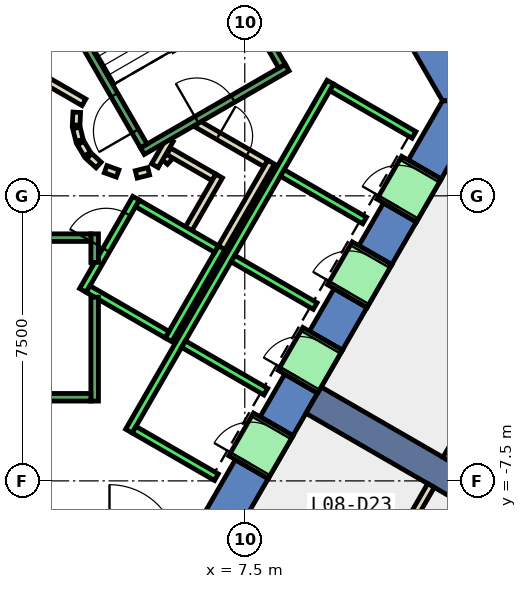
"""IFC4 building model, lengths in metres.
Left out: names, types, materials, properties, quantities, classifications, styles, units other than length and angle.
Written with IfcOpenShell. Run it as: python <this file> out.ifc"""

import sys

from ifc_helpers import new_model, si_unit, direction, frame, frame_2d, origin, place, context, subcontext, project, spatial, polyline, rectangle, outline, extrude, element, fill, save


model = new_model("IFC4")
c1 = context("Model", 3, precision=1e-05, world=origin(), true_north=direction((0.0, 1.0)))
c2 = subcontext(c1, "Body", "Model", "MODEL_VIEW")
j1 = project(units=[si_unit("LENGTHUNIT", "METRE"), si_unit("PLANEANGLEUNIT", "RADIAN")], contexts=[c1])
p1 = place(None, origin())
s1 = spatial("IfcSite", under=j1, at=p1, CompositionType="ELEMENT")
p2 = place(p1, origin())
s2 = spatial("IfcBuilding", under=s1, at=p2, CompositionType="ELEMENT")
p3 = place(p2, frame((0.0, 0.0, 43.4)))
s3 = spatial("IfcBuildingStorey", under=s2, at=p3, CompositionType="ELEMENT", Elevation=43.4)
p4 = place(p3, frame((0.0, 0.0, -0.4)))
e1 = element("IfcWall", 1, at=p4, inside=s3, PredefinedType="SHEAR", context=c2, shape_type="SweptSolid", body=[
    extrude(outline(polyline([(8.517, 11.748), (7.651, 11.248), (12.702, 2.5), (13.856, 2.5), (8.517, 11.748)])), origin(), (0.0, 0.0, 1.0), 4.2),
])
p5 = place(p3, frame((0.0, 0.0, -0.4)))
e2 = element("IfcWall", 2, at=p5, inside=s3, PredefinedType="SHEAR", context=c2, shape_type="SweptSolid", body=[
    extrude(outline(polyline([(8.117, -7.44), (7.252, -6.94), (6.351, -8.5), (6.928, -9.5), (8.117, -7.44)])), origin(), (0.0, 0.0, 1.0), 4.2),
])
p6 = place(p3, frame((0.0, 0.0, -0.4)))
e3 = element("IfcWall", 3, at=p6, inside=s3, PredefinedType="SHEAR", context=c2, shape_type="SweptSolid", body=[
    extrude(outline(polyline([(9.417, -5.189), (8.551, -4.689), (7.902, -5.814), (8.767, -6.314), (9.417, -5.189)])), origin(), (0.0, 0.0, 1.0), 4.2),
])
p7 = place(p3, frame((0.0, 0.0, -0.4)))
e4 = element("IfcWall", 4, at=p7, inside=s3, PredefinedType="SHEAR", context=c2, shape_type="SweptSolid", body=[
    extrude(outline(polyline([(10.717, -2.937), (9.851, -2.437), (9.201, -3.563), (10.067, -4.063), (10.717, -2.937)])), origin(), (0.0, 0.0, 1.0), 4.2),
])
p8 = place(p3, frame((0.0, 0.0, -0.4)))
e5 = element("IfcWall", 5, at=p8, inside=s3, PredefinedType="SHEAR", context=c2, shape_type="SweptSolid", body=[
    extrude(outline(polyline([(12.017, -0.686), (11.151, -0.186), (10.501, -1.311), (11.367, -1.811), (12.017, -0.686)])), origin(), (0.0, 0.0, 1.0), 4.2),
])
p9 = place(p3, frame((0.0, 0.0, -0.4)))
e6 = element("IfcWall", 6, at=p9, inside=s3, PredefinedType="SHEAR", context=c2, shape_type="SweptSolid", body=[
    extrude(outline(polyline([(11.801, 0.94), (12.667, 0.44), (13.856, 2.5), (12.702, 2.5), (11.801, 0.94)])), origin(), (0.0, 0.0, 1.0), 4.2),
])
p10 = place(p3, frame((0.0, 0.0, 3.6)))
e7 = element("IfcWall", 7, at=p10, inside=s3, PredefinedType="SHEAR", context=c2, shape_type="SweptSolid", body=[
    extrude(outline(polyline([(8.767, -6.314), (7.902, -5.814), (7.252, -6.94), (8.117, -7.44), (8.767, -6.314)])), origin(), (0.0, 0.0, 1.0), 0.2),
])
p11 = place(p3, frame((0.0, 0.0, 3.6)))
e8 = element("IfcWall", 8, at=p11, inside=s3, PredefinedType="SHEAR", context=c2, shape_type="SweptSolid", body=[
    extrude(outline(polyline([(10.067, -4.063), (9.201, -3.563), (8.551, -4.689), (9.417, -5.189), (10.067, -4.063)])), origin(), (0.0, 0.0, 1.0), 0.2),
])
p12 = place(p3, frame((0.0, 0.0, 3.6)))
e9 = element("IfcWall", 9, at=p12, inside=s3, PredefinedType="SHEAR", context=c2, shape_type="SweptSolid", body=[
    extrude(outline(polyline([(11.367, -1.811), (10.501, -1.311), (9.851, -2.437), (10.717, -2.937), (11.367, -1.811)])), origin(), (0.0, 0.0, 1.0), 0.2),
])
p13 = place(p3, frame((0.0, 0.0, 3.6)))
e10 = element("IfcWall", 10, at=p13, inside=s3, PredefinedType="SHEAR", context=c2, shape_type="SweptSolid", body=[
    extrude(outline(polyline([(12.667, 0.44), (11.801, 0.94), (11.151, -0.186), (12.017, -0.686), (12.667, 0.44)])), origin(), (0.0, 0.0, 1.0), 0.2),
])
p14 = place(p3, frame((9.31, -5.375, -0.4), z_axis=(0.0, 0.0, 1.0), x_axis=(0.866017533419, -0.500013631625, 0.0)))
e11 = element("IfcWall", 11, at=p14, inside=s3, PredefinedType="SHEAR", context=c2, shape_type="SweptSolid", body=[
    extrude(rectangle(XDim=9.0, YDim=0.8, at=frame_2d((4.5, 0.0))), origin(), (0.0, 0.0, 1.0), 4.2),
])
p15 = place(p3, frame((5.39, 0.898, 0.0), z_axis=(0.0, 0.0, 1.0), x_axis=(0.673828488714, 0.738887791073, 0.0)))
e12 = element("IfcWall", 12, at=p15, inside=s3, PredefinedType="PARTITIONING", context=c2, shape_type="SweptSolid", body=[
    extrude(rectangle(XDim=0.263, YDim=0.2, at=frame_2d((0.131, 0.0))), origin(), (0.0, 0.0, 1.0), 3.8),
])
p16 = place(p3, frame((5.499, 1.172, 0.0), z_axis=(0.0, 0.0, 1.0), x_axis=(0.866333505267, -0.499465972466, 0.0)))
e13 = element("IfcWall", 13, at=p16, inside=s3, PredefinedType="PARTITIONING", context=c2, shape_type="SweptSolid", body=[
    extrude(rectangle(XDim=1.374, YDim=0.2, at=frame_2d((0.687, 0.0))), origin(), (0.0, 0.0, 1.0), 3.8),
])
p17 = place(p3, frame((6.826, 0.522, 0.0), z_axis=(0.0, 0.0, 1.0), x_axis=(-0.500016722714, -0.866015748706, 0.0)))
e14 = element("IfcWall", 14, at=p17, inside=s3, PredefinedType="PARTITIONING", context=c2, shape_type="SweptSolid", body=[
    extrude(rectangle(XDim=1.7, YDim=0.2, at=frame_2d((0.85, 0.0))), origin(), (0.0, 0.0, 1.0), 3.8),
])
p18 = place(p3, frame((6.25, 1.894, 0.0), z_axis=(0.0, 0.0, 1.0), x_axis=(0.866043184279, -0.499969202016, 0.0)))
e15 = element("IfcWall", 15, at=p18, inside=s3, PredefinedType="PARTITIONING", context=c2, shape_type="SweptSolid", body=[
    extrude(rectangle(XDim=2.084, YDim=0.2, at=frame_2d((1.042, 0.0))), origin(), (0.0, 0.0, 1.0), 3.8),
])
p19 = place(p18, frame((0.642, 0.0, 0.0)))
e16 = element("IfcOpeningElement", 16, at=p19, cuts=e15, PredefinedType="OPENING", context=c2, shape_type="SweptSolid", body=[
    extrude(rectangle(XDim=0.9, YDim=2.1, at=frame_2d((0.45, 1.05))), frame((0.0, 0.11, 0.0), z_axis=(0.0, -1.0, 0.0), x_axis=(1.0, 0.0, 0.0)), (0.0, 0.0, 1.0), 0.22),
])
p20 = place(p3, frame((8.192, 0.888, 0.0), z_axis=(0.0, 0.0, 1.0), x_axis=(-0.499940625693, -0.866059680843, 0.0)))
e17 = element("IfcWall", 17, at=p20, inside=s3, PredefinedType="PARTITIONING", context=c2, shape_type="SweptSolid", body=[
    extrude(rectangle(XDim=2.68, YDim=0.2, at=frame_2d((1.34, 0.0))), origin(), (0.0, 0.0, 1.0), 3.8),
])
p21 = place(p3, frame((5.135, 0.793, 0.0), z_axis=(0.0, 0.0, 1.0), x_axis=(0.499526442893, 0.866298639529, 0.0)))
e18 = element("IfcWall", 18, at=p21, inside=s3, PredefinedType="PARTITIONING", context=c2, shape_type="SweptSolid", body=[
    extrude(rectangle(XDim=0.791, YDim=0.2, at=frame_2d((0.396, 0.0))), origin(), (0.0, 0.0, 1.0), 3.8),
])
p22 = place(p3, frame((2.012, 3.186, 0.0), z_axis=(0.0, 0.0, 1.0), x_axis=(0.865891012941, -0.500232699559, 0.0)))
e19 = element("IfcWall", 19, at=p22, inside=s3, PredefinedType="PARTITIONING", context=c2, shape_type="SweptSolid", body=[
    extrude(rectangle(XDim=1.449, YDim=0.2, at=frame_2d((0.725, 0.0))), origin(), (0.0, 0.0, 1.0), 3.8),
])
p23 = place(p3, frame((3.079, 2.199, 0.0), z_axis=(0.0, 0.0, 1.0), x_axis=(-0.047771483479, -0.998858290933, 0.0)))
e20 = element("IfcWall", 20, at=p23, inside=s3, PredefinedType="PARTITIONING", context=c2, shape_type="SweptSolid", body=[
    extrude(rectangle(XDim=0.337, YDim=0.2, at=frame_2d((0.169, 0.0))), origin(), (0.0, 0.0, 1.0), 3.8),
])
p24 = place(p3, frame((3.07, 1.786, 0.0), z_axis=(0.0, 0.0, 1.0), x_axis=(0.242705583207, -0.970099994784, 0.0)))
e21 = element("IfcWall", 21, at=p24, inside=s3, PredefinedType="PARTITIONING", context=c2, shape_type="SweptSolid", body=[
    extrude(rectangle(XDim=0.338, YDim=0.2, at=frame_2d((0.169, 0.0))), origin(), (0.0, 0.0, 1.0), 3.8),
])
for number, where, z_axis, x_axis in (
    (22, (3.182, 1.388, 0.0), (0.0, 0.0, 1.0), (0.512, -0.859, 0.0)),
    (23, (3.404, 1.039, 0.0), (0.0, 0.0, 1.0), (0.74, -0.672, 0.0)),
):
    element("IfcWall", number, at=place(p3, frame(where, z_axis=z_axis, x_axis=x_axis)), inside=s3, PredefinedType="PARTITIONING", context=c2, shape_type="SweptSolid", body=[
        extrude(rectangle(XDim=0.338, YDim=0.2, at=frame_2d((0.169, 0.0))), origin(), (0.0, 0.0, 1.0), 3.8),
    ])
p25 = place(p3, frame((3.838, 0.702, 0.0), z_axis=(0.0, 0.0, 1.0), x_axis=(0.941035081519, -0.338308993895, 0.0)))
e24 = element("IfcWall", 24, at=p25, inside=s3, PredefinedType="PARTITIONING", context=c2, shape_type="SweptSolid", body=[
    extrude(rectangle(XDim=0.337, YDim=0.2, at=frame_2d((0.168, 0.0))), origin(), (0.0, 0.0, 1.0), 3.8),
])
p26 = place(p3, frame((4.644, 0.564, 0.0), z_axis=(0.0, 0.0, 1.0), x_axis=(0.969929076366, 0.243387729394, 0.0)))
e25 = element("IfcWall", 25, at=p26, inside=s3, PredefinedType="PARTITIONING", context=c2, shape_type="SweptSolid", body=[
    extrude(rectangle(XDim=0.337, YDim=0.2, at=frame_2d((0.168, 0.0))), origin(), (0.0, 0.0, 1.0), 3.8),
])
p27 = place(p3, frame((15.122, -2.908, 0.0), z_axis=(0.0, 0.0, 1.0), x_axis=(-0.499922740561, -0.866070004948, 0.0)))
e26 = element("IfcWall", 26, at=p27, inside=s3, PredefinedType="PARTITIONING", context=c2, shape_type="SweptSolid", body=[
    extrude(rectangle(XDim=4.643, YDim=0.2, at=frame_2d((2.321, 0.0))), origin(), (0.0, 0.0, 1.0), 3.8),
])
p28 = place(p3, frame((12.401, -7.621, 0.0), z_axis=(0.0, 0.0, 1.0), x_axis=(-0.499983724212, -0.866034800411, 0.0)))
e27 = element("IfcWall", 27, at=p28, inside=s3, PredefinedType="PARTITIONING", context=c2, shape_type="SweptSolid", body=[
    extrude(rectangle(XDim=9.302, YDim=0.2, at=frame_2d((4.651, 0.0))), origin(), (0.0, 0.0, 1.0), 3.8),
])
p29 = place(p28, frame((1.429, 0.0, 0.0)))
e28 = element("IfcOpeningElement", 28, at=p29, cuts=e27, PredefinedType="OPENING", context=c2, shape_type="SweptSolid", body=[
    extrude(rectangle(XDim=1.0, YDim=2.1, at=frame_2d((0.5, 1.05))), frame((0.0, 0.11, 0.0), z_axis=(0.0, -1.0, 0.0), x_axis=(1.0, 0.0, 0.0)), (0.0, 0.0, 1.0), 0.22),
])
p30 = place(p28, frame((2.529, 0.0, 0.0)))
e29 = element("IfcOpeningElement", 29, at=p30, cuts=e27, PredefinedType="OPENING", context=c2, shape_type="SweptSolid", body=[
    extrude(rectangle(XDim=1.0, YDim=2.1, at=frame_2d((0.5, 1.05))), frame((0.0, 0.11, 0.0), z_axis=(0.0, -1.0, 0.0), x_axis=(1.0, 0.0, 0.0)), (0.0, 0.0, 1.0), 0.22),
])
p31 = place(p3, frame((3.24, -2.488, 0.0), z_axis=(0.0, 0.0, 1.0), x_axis=(0.49994636267, 0.866056369097, 0.0)))
e30 = element("IfcWall", 30, at=p31, inside=s3, PredefinedType="STANDARD", context=c2, shape_type="SweptSolid", body=[
    extrude(rectangle(XDim=2.8, YDim=0.2, at=frame_2d((1.4, 0.0))), origin(), (0.0, 0.0, 1.0), 3.8),
])
p32 = place(p31, frame((1.225, 0.0, 0.0)))
e31 = element("IfcOpeningElement", 31, at=p32, cuts=e30, PredefinedType="OPENING", context=c2, shape_type="SweptSolid", body=[
    extrude(rectangle(XDim=1.1, YDim=2.1, at=frame_2d((0.55, 1.05))), frame((0.0, 0.11, 0.0), z_axis=(0.0, -1.0, 0.0), x_axis=(1.0, 0.0, 0.0)), (0.0, 0.0, 1.0), 0.22),
])
p33 = place(p3, frame((5.492, -3.788, 0.0), z_axis=(0.0, 0.0, 1.0), x_axis=(0.500011755427, 0.866018616679, 0.0)))
e32 = element("IfcWall", 32, at=p33, inside=s3, PredefinedType="STANDARD", context=c2, shape_type="SweptSolid", body=[
    extrude(rectangle(XDim=2.8, YDim=0.2, at=frame_2d((1.4, 0.0))), origin(), (0.0, 0.0, 1.0), 3.8),
])
p34 = place(p3, frame((3.377, -2.452, 0.0), z_axis=(0.0, 0.0, 1.0), x_axis=(0.865955154139, -0.50012165622, 0.0)))
e33 = element("IfcWall", 33, at=p34, inside=s3, PredefinedType="STANDARD", context=c2, shape_type="SweptSolid", body=[
    extrude(rectangle(XDim=2.4, YDim=0.2, at=frame_2d((1.2, 0.0))), origin(), (0.0, 0.0, 1.0), 3.8),
])
p35 = place(p3, frame((4.677, -0.2, 0.0), z_axis=(0.0, 0.0, 1.0), x_axis=(0.865973769406, -0.500089422704, 0.0)))
e34 = element("IfcWall", 34, at=p35, inside=s3, PredefinedType="STANDARD", context=c2, shape_type="SweptSolid", body=[
    extrude(rectangle(XDim=2.399, YDim=0.2, at=frame_2d((1.2, 0.0))), origin(), (0.0, 0.0, 1.0), 3.8),
])
p36 = place(p3, frame((4.451, -6.19, 0.0), z_axis=(0.0, 0.0, 1.0), x_axis=(0.50000090737, 0.866024879913, 0.0)))
e35 = element("IfcWall", 35, at=p36, inside=s3, PredefinedType="STANDARD", context=c2, shape_type="SweptSolid", body=[
    extrude(rectangle(XDim=10.6, YDim=0.2, at=frame_2d((5.3, 0.0))), origin(), (0.0, 0.0, 1.0), 3.8),
])
for number, where, z_axis, x_axis in (
    (36, (4.588, -6.153, 0.0), (0.0, 0.0, 1.0), (0.866, -0.5, 0.0)),
    (37, (5.888, -3.902, 0.0), (0.0, 0.0, 1.0), (0.866, -0.5, 0.0)),
    (38, (7.188, -1.65, 0.0), (0.0, 0.0, 1.0), (0.866, -0.5, 0.0)),
    (39, (8.488, 0.602, 0.0), (0.0, 0.0, 1.0), (0.866, -0.5, 0.0)),
):
    element("IfcWall", number, at=place(p3, frame(where, z_axis=z_axis, x_axis=x_axis)), inside=s3, PredefinedType="STANDARD", context=c2, shape_type="SweptSolid", body=[
        extrude(rectangle(XDim=2.5, YDim=0.2, at=frame_2d((1.25, 0.0))), origin(), (0.0, 0.0, 1.0), 3.8),
    ])
p37 = place(p3, frame((9.788, 2.853, 0.0), z_axis=(0.0, 0.0, 1.0), x_axis=(0.865998541277, -0.500046524342, 0.0)))
e40 = element("IfcWall", 40, at=p37, inside=s3, PredefinedType="STANDARD", context=c2, shape_type="SweptSolid", body=[
    extrude(rectangle(XDim=2.5, YDim=0.2, at=frame_2d((1.25, 0.0))), origin(), (0.0, 0.0, 1.0), 3.8),
])
p38 = place(p3, frame((7.598, -7.14, 0.0), z_axis=(0.0, 0.0, 1.0), x_axis=(0.500362116554, 0.865816234728, 0.0)))
e41 = element("IfcWall", 41, at=p38, inside=s3, PredefinedType="STANDARD", context=c2, shape_type="SweptSolid", body=[
    extrude(rectangle(XDim=1.299, YDim=1.2, at=frame_2d((0.65, 0.0))), origin(), (0.0, 0.0, 1.0), 2.4),
])
p39 = place(p38, frame((0.1, 0.0, 0.0)))
e42 = element("IfcOpeningElement", 42, at=p39, cuts=e41, PredefinedType="OPENING", context=c2, shape_type="SweptSolid", body=[
    extrude(rectangle(XDim=1.1, YDim=2.3, at=frame_2d((0.55, 1.15))), frame((0.0, 0.61, 0.0), z_axis=(0.0, -1.0, 0.0), x_axis=(1.0, 0.0, 0.0)), (0.0, 0.0, 1.0), 1.22),
])
p40 = place(p3, frame((8.898, -4.889, 0.0), z_axis=(0.0, 0.0, 1.0), x_axis=(0.500036693733, 0.866004217611, 0.0)))
e43 = element("IfcWall", 43, at=p40, inside=s3, PredefinedType="STANDARD", context=c2, shape_type="SweptSolid", body=[
    extrude(rectangle(XDim=1.3, YDim=1.2, at=frame_2d((0.65, 0.0))), origin(), (0.0, 0.0, 1.0), 2.4),
])
p41 = place(p40, frame((0.1, 0.0, 0.0)))
e44 = element("IfcOpeningElement", 44, at=p41, cuts=e43, PredefinedType="OPENING", context=c2, shape_type="SweptSolid", body=[
    extrude(rectangle(XDim=1.1, YDim=2.3, at=frame_2d((0.55, 1.15))), frame((0.0, 0.61, 0.0), z_axis=(0.0, -1.0, 0.0), x_axis=(1.0, 0.0, 0.0)), (0.0, 0.0, 1.0), 1.22),
])
p42 = place(p3, frame((10.198, -2.637, 0.0), z_axis=(0.0, 0.0, 1.0), x_axis=(0.49989585183, 0.866085525409, 0.0)))
e45 = element("IfcWall", 45, at=p42, inside=s3, PredefinedType="STANDARD", context=c2, shape_type="SweptSolid", body=[
    extrude(rectangle(XDim=1.3, YDim=1.2, at=frame_2d((0.65, 0.0))), origin(), (0.0, 0.0, 1.0), 2.4),
])
p43 = place(p42, frame((0.1, 0.0, 0.0)))
e46 = element("IfcOpeningElement", 46, at=p43, cuts=e45, PredefinedType="OPENING", context=c2, shape_type="SweptSolid", body=[
    extrude(rectangle(XDim=1.1, YDim=2.3, at=frame_2d((0.55, 1.15))), frame((0.0, 0.61, 0.0), z_axis=(0.0, -1.0, 0.0), x_axis=(1.0, 0.0, 0.0)), (0.0, 0.0, 1.0), 1.22),
])
p44 = place(p3, frame((11.498, -0.385, 0.0), z_axis=(0.0, 0.0, 1.0), x_axis=(0.500221244143, 0.865897630733, 0.0)))
e47 = element("IfcWall", 47, at=p44, inside=s3, PredefinedType="STANDARD", context=c2, shape_type="SweptSolid", body=[
    extrude(rectangle(XDim=1.299, YDim=1.2, at=frame_2d((0.65, 0.0))), origin(), (0.0, 0.0, 1.0), 2.4),
])
p45 = place(p44, frame((0.1, 0.0, 0.0)))
e48 = element("IfcOpeningElement", 48, at=p45, cuts=e47, PredefinedType="OPENING", context=c2, shape_type="SweptSolid", body=[
    extrude(rectangle(XDim=1.1, YDim=2.3, at=frame_2d((0.55, 1.15))), frame((0.0, 0.61, 0.0), z_axis=(0.0, -1.0, 0.0), x_axis=(1.0, 0.0, 0.0)), (0.0, 0.0, 1.0), 1.22),
])
p46 = place(p3, frame((3.55, -2.667, 0.0), z_axis=(0.0, 0.0, 1.0), x_axis=(0.0, -1.0, 0.0)))
e49 = element("IfcWall", 49, at=p46, inside=s3, PredefinedType="STANDARD", context=c2, shape_type="SweptSolid", body=[
    extrude(rectangle(XDim=2.733, YDim=0.2, at=frame_2d((1.366, 0.0))), origin(), (0.0, 0.0, 1.0), 3.8),
])
p47 = place(p3, frame((3.55, -1.0, 0.0), z_axis=(0.0, 0.0, 1.0), x_axis=(0.0, -1.0, 0.0)))
e50 = element("IfcWall", 50, at=p47, inside=s3, PredefinedType="STANDARD", context=c2, shape_type="SweptSolid", body=[
    extrude(rectangle(XDim=0.751, YDim=0.2, at=frame_2d((0.375, 0.0))), origin(), (0.0, 0.0, 1.0), 3.8),
])
p48 = place(p3, frame((-3.45, -1.1, 0.0), z_axis=(0.0, 0.0, 1.0), x_axis=(1.0, 0.0, 0.0)))
e51 = element("IfcWall", 51, at=p48, inside=s3, PredefinedType="STANDARD", context=c2, shape_type="SweptSolid", body=[
    extrude(rectangle(XDim=6.9, YDim=0.2, at=frame_2d((3.45, 0.0))), origin(), (0.0, 0.0, 1.0), 3.8),
])
p49 = place(p48, frame((0.45, 0.0, 0.0)))
e52 = element("IfcOpeningElement", 52, at=p49, cuts=e51, PredefinedType="OPENING", context=c2, shape_type="SweptSolid", body=[
    extrude(rectangle(XDim=1.1, YDim=2.2, at=frame_2d((0.55, 1.1))), frame((0.0, 0.11, 0.0), z_axis=(0.0, -1.0, 0.0), x_axis=(1.0, 0.0, 0.0)), (0.0, 0.0, 1.0), 0.22),
])
p50 = place(p3, frame((-3.45, -5.3, 0.0), z_axis=(0.0, 0.0, 1.0), x_axis=(1.0, 0.0, 0.0)))
e53 = element("IfcWall", 53, at=p50, inside=s3, PredefinedType="STANDARD", context=c2, shape_type="SweptSolid", body=[
    extrude(rectangle(XDim=6.9, YDim=0.2, at=frame_2d((3.45, 0.0))), origin(), (0.0, 0.0, 1.0), 3.8),
])
p51 = place(p3, frame((4.806, 1.176, 0.0), z_axis=(0.0, 0.0, 1.0), x_axis=(0.866059941101, 0.499940174841, 0.0)))
e54 = element("IfcWall", 54, at=p51, inside=s3, PredefinedType="STANDARD", context=c2, shape_type="SweptSolid", body=[
    extrude(rectangle(XDim=4.4, YDim=0.2, at=frame_2d((2.2, 0.0))), origin(), (0.0, 0.0, 1.0), 3.8),
])
p52 = place(p51, frame((1.65, 0.0, 0.0)))
e55 = element("IfcOpeningElement", 55, at=p52, cuts=e54, PredefinedType="OPENING", context=c2, shape_type="SweptSolid", body=[
    extrude(rectangle(XDim=1.1, YDim=2.2, at=frame_2d((0.55, 1.1))), frame((0.0, 0.11, 0.0), z_axis=(0.0, -1.0, 0.0), x_axis=(1.0, 0.0, 0.0)), (0.0, 0.0, 1.0), 0.22),
])
p53 = place(p3, frame((4.843, 1.312, 0.0), z_axis=(0.0, 0.0, 1.0), x_axis=(-0.499963383562, 0.866046543262, 0.0)))
e56 = element("IfcWall", 56, at=p53, inside=s3, PredefinedType="STANDARD", context=c2, shape_type="SweptSolid", body=[
    extrude(rectangle(XDim=6.9, YDim=0.2, at=frame_2d((3.45, 0.0))), origin(), (0.0, 0.0, 1.0), 3.8),
])
p54 = place(p53, frame((0.45, 0.0, 0.0)))
e57 = element("IfcOpeningElement", 57, at=p54, cuts=e56, PredefinedType="OPENING", context=c2, shape_type="SweptSolid", body=[
    extrude(rectangle(XDim=1.1, YDim=2.2, at=frame_2d((0.55, 1.1))), frame((0.0, 0.11, 0.0), z_axis=(0.0, -1.0, 0.0), x_axis=(1.0, 0.0, 0.0)), (0.0, 0.0, 1.0), 0.22),
])
p55 = place(p3, frame((8.48, 3.412, 0.0), z_axis=(0.0, 0.0, 1.0), x_axis=(-0.499978703459, 0.866037698999, 0.0)))
e58 = element("IfcWall", 58, at=p55, inside=s3, PredefinedType="STANDARD", context=c2, shape_type="SweptSolid", body=[
    extrude(rectangle(XDim=6.9, YDim=0.2, at=frame_2d((3.45, 0.0))), origin(), (0.0, 0.0, 1.0), 3.8),
])
p56 = place(p19, origin())
e59 = element("IfcDoor", 59, at=p56, inside=s3, OperationType="SINGLE_SWING_LEFT", PredefinedType="DOOR", context=c2, shape_type="SweptSolid", body=[
    extrude(rectangle(XDim=0.9, YDim=2.1, at=frame_2d((0.45, 1.05))), frame((0.0, 0.025, 0.0), z_axis=(0.0, -1.0, 0.0), x_axis=(1.0, 0.0, 0.0)), (0.0, 0.0, 1.0), 0.05),
])
fill(e16, e59)
p57 = place(p39, origin())
e60 = element("IfcDoor", 60, at=p57, inside=s3, OperationType="SLIDING_TO_LEFT", PredefinedType="DOOR", context=c2, shape_type="SweptSolid", body=[
    extrude(rectangle(XDim=1.1, YDim=2.3, at=frame_2d((0.55, 1.15))), frame((0.0, 0.025, 0.0), z_axis=(0.0, -1.0, 0.0), x_axis=(1.0, 0.0, 0.0)), (0.0, 0.0, 1.0), 0.05),
])
fill(e42, e60)
p58 = place(p41, origin())
e61 = element("IfcDoor", 61, at=p58, inside=s3, OperationType="SLIDING_TO_LEFT", PredefinedType="DOOR", context=c2, shape_type="SweptSolid", body=[
    extrude(rectangle(XDim=1.1, YDim=2.3, at=frame_2d((0.55, 1.15))), frame((0.0, 0.025, 0.0), z_axis=(0.0, -1.0, 0.0), x_axis=(1.0, 0.0, 0.0)), (0.0, 0.0, 1.0), 0.05),
])
fill(e44, e61)
p59 = place(p43, origin())
e62 = element("IfcDoor", 62, at=p59, inside=s3, OperationType="SLIDING_TO_LEFT", PredefinedType="DOOR", context=c2, shape_type="SweptSolid", body=[
    extrude(rectangle(XDim=1.1, YDim=2.3, at=frame_2d((0.55, 1.15))), frame((0.0, 0.025, 0.0), z_axis=(0.0, -1.0, 0.0), x_axis=(1.0, 0.0, 0.0)), (0.0, 0.0, 1.0), 0.05),
])
fill(e46, e62)
p60 = place(p45, origin())
e63 = element("IfcDoor", 63, at=p60, inside=s3, OperationType="SLIDING_TO_LEFT", PredefinedType="DOOR", context=c2, shape_type="SweptSolid", body=[
    extrude(rectangle(XDim=1.1, YDim=2.3, at=frame_2d((0.55, 1.15))), frame((0.0, 0.025, 0.0), z_axis=(0.0, -1.0, 0.0), x_axis=(1.0, 0.0, 0.0)), (0.0, 0.0, 1.0), 0.05),
])
fill(e48, e63)
p61 = place(p32, origin())
e64 = element("IfcDoor", 64, at=p61, inside=s3, OperationType="SLIDING_TO_LEFT", PredefinedType="DOOR", context=c2, shape_type="SweptSolid", body=[
    extrude(rectangle(XDim=1.1, YDim=2.1, at=frame_2d((0.55, 1.05))), frame((0.0, 0.025, 0.0), z_axis=(0.0, -1.0, 0.0), x_axis=(1.0, 0.0, 0.0)), (0.0, 0.0, 1.0), 0.05),
])
fill(e31, e64)
p62 = place(p54, origin())
e65 = element("IfcDoor", 65, at=p62, inside=s3, OperationType="SINGLE_SWING_LEFT", PredefinedType="DOOR", context=c2, shape_type="SweptSolid", body=[
    extrude(rectangle(XDim=1.1, YDim=2.2, at=frame_2d((0.55, 1.1))), frame((0.0, 0.025, 0.0), z_axis=(0.0, -1.0, 0.0), x_axis=(1.0, 0.0, 0.0)), (0.0, 0.0, 1.0), 0.05),
])
fill(e57, e65)
p63 = place(p52, origin())
e66 = element("IfcDoor", 66, at=p63, inside=s3, OperationType="SINGLE_SWING_LEFT", PredefinedType="DOOR", context=c2, shape_type="SweptSolid", body=[
    extrude(rectangle(XDim=1.1, YDim=2.2, at=frame_2d((0.55, 1.1))), frame((0.0, 0.025, 0.0), z_axis=(0.0, -1.0, 0.0), x_axis=(1.0, 0.0, 0.0)), (0.0, 0.0, 1.0), 0.05),
])
fill(e55, e66)
save(model, sys.argv[1])
